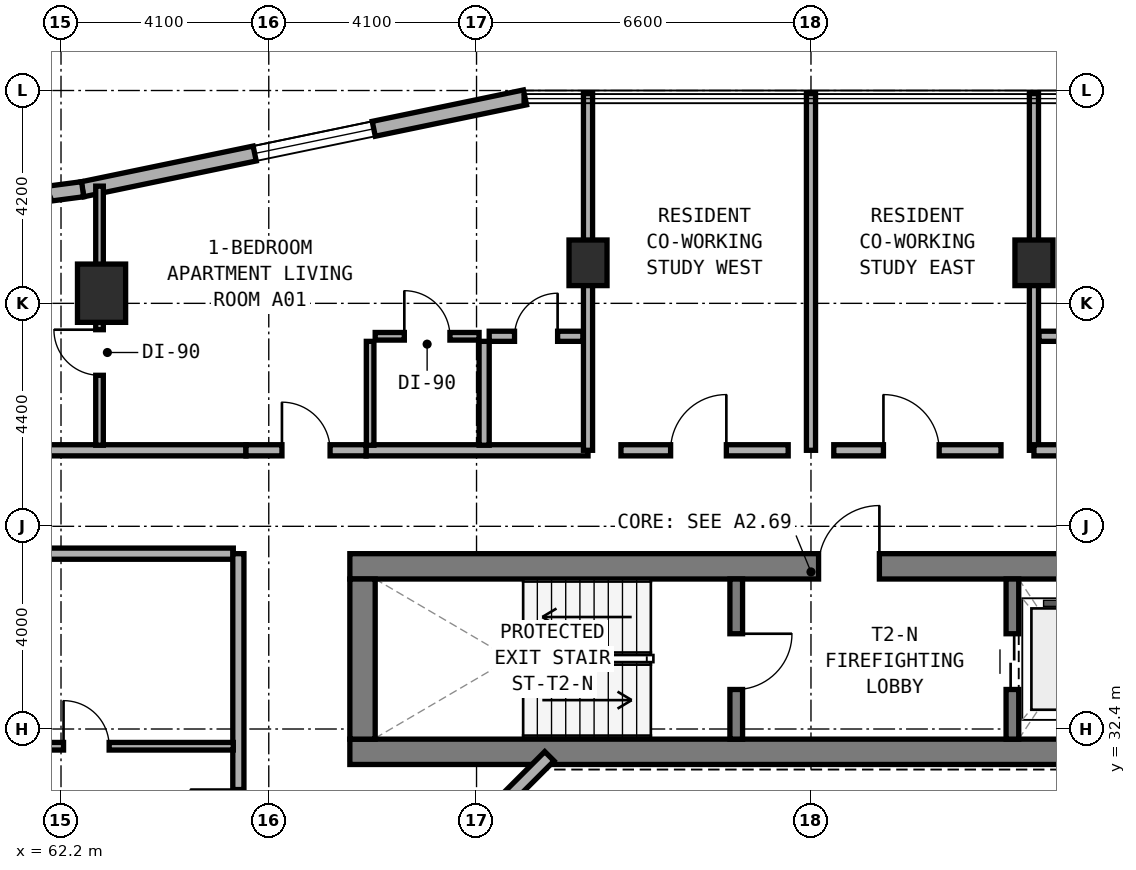
"""IFC4 building model, lengths in metres.
Left out: names, types, materials, properties, quantities, classifications, styles, units other than length and angle.
Written with IfcOpenShell. Run it as: python <this file> out.ifc"""

import sys

from ifc_helpers import new_model, si_unit, direction, frame, frame_2d, origin, origin_2d, place, context, subcontext, project, spatial, rectangle, extrude, element, fill, save


model = new_model("IFC4")
c1 = context("Model", 3, precision=1e-05, world=origin(), true_north=direction((0.0, 1.0)))
c2 = subcontext(c1, "Body", "Model", "MODEL_VIEW")
j1 = project(units=[si_unit("LENGTHUNIT", "METRE"), si_unit("PLANEANGLEUNIT", "RADIAN")], contexts=[c1])
p1 = place(None, origin())
s1 = spatial("IfcSite", under=j1, at=p1, CompositionType="ELEMENT")
p2 = place(p1, origin())
s2 = spatial("IfcBuilding", under=s1, at=p2, CompositionType="ELEMENT")
p3 = place(p2, frame((0.0, 0.0, 62.5)))
s3 = spatial("IfcBuildingStorey", under=s2, at=p3, CompositionType="ELEMENT", Elevation=62.5)
p4 = place(p3, frame((67.9, 31.95, 0.0), z_axis=(0.0, 0.0, 1.0), x_axis=(1.0, 0.0, 0.0)))
e1 = element("IfcWall", 1, at=p4, inside=s3, PredefinedType="SHEAR", context=c2, shape_type="SweptSolid", body=[
    extrude(rectangle(XDim=18.4, YDim=0.5, at=frame_2d((9.2, 0.0))), origin(), (0.0, 0.0, 1.0), 3.5),
])
p5 = place(p3, frame((67.9, 35.61, 0.0), z_axis=(0.0, 0.0, 1.0), x_axis=(1.0, 0.0, 0.0)))
e2 = element("IfcWall", 2, at=p5, inside=s3, PredefinedType="SHEAR", context=c2, shape_type="SweptSolid", body=[
    extrude(rectangle(XDim=18.4, YDim=0.5, at=frame_2d((9.2, 0.0))), origin(), (0.0, 0.0, 1.0), 3.5),
])
p6 = place(p5, frame((9.25, 0.0, 0.0)))
e3 = element("IfcOpeningElement", 3, at=p6, cuts=e2, PredefinedType="OPENING", context=c2, shape_type="SweptSolid", body=[
    extrude(rectangle(XDim=1.2, YDim=2.15, at=frame_2d((0.6, 1.075))), frame((0.0, 0.26, 0.0), z_axis=(0.0, -1.0, 0.0), x_axis=(1.0, 0.0, 0.0)), (0.0, 0.0, 1.0), 0.52),
])
p7 = place(p5, frame((16.85, 0.0, 0.0)))
e4 = element("IfcOpeningElement", 4, at=p7, cuts=e2, PredefinedType="OPENING", context=c2, shape_type="SweptSolid", body=[
    extrude(rectangle(XDim=0.85, YDim=2.1, at=frame_2d((0.425, 1.05))), frame((0.0, 0.26, 0.0), z_axis=(0.0, -1.0, 0.0), x_axis=(1.0, 0.0, 0.0)), (0.0, 0.0, 1.0), 0.52),
])
p8 = place(p3, frame((68.15, 32.2, 0.0), z_axis=(0.0, 0.0, 1.0), x_axis=(0.0, 1.0, 0.0)))
e5 = element("IfcWall", 5, at=p8, inside=s3, PredefinedType="SHEAR", context=c2, shape_type="SweptSolid", body=[
    extrude(rectangle(XDim=3.16, YDim=0.5, at=frame_2d((1.58, 0.0))), origin(), (0.0, 0.0, 1.0), 3.5),
])
p9 = place(p3, frame((75.525, 32.2, 0.0), z_axis=(0.0, 0.0, 1.0), x_axis=(0.0, 1.0, 0.0)))
e6 = element("IfcWall", 6, at=p9, inside=s3, PredefinedType="STANDARD", context=c2, shape_type="SweptSolid", body=[
    extrude(rectangle(XDim=3.16, YDim=0.25, at=frame_2d((1.58, 0.0))), origin(), (0.0, 0.0, 1.0), 3.25),
])
p10 = place(p9, frame((0.98, 0.0, 0.0)))
e7 = element("IfcOpeningElement", 7, at=p10, cuts=e6, PredefinedType="OPENING", context=c2, shape_type="SweptSolid", body=[
    extrude(rectangle(XDim=1.1, YDim=2.15, at=frame_2d((0.55, 1.075))), frame((0.0, 0.135, 0.0), z_axis=(0.0, -1.0, 0.0), x_axis=(1.0, 0.0, 0.0)), (0.0, 0.0, 1.0), 0.27),
])
p11 = place(p3, frame((80.975, 32.2, 0.0), z_axis=(0.0, 0.0, 1.0), x_axis=(0.0, 1.0, 0.0)))
e8 = element("IfcWall", 8, at=p11, inside=s3, PredefinedType="STANDARD", context=c2, shape_type="SweptSolid", body=[
    extrude(rectangle(XDim=3.16, YDim=0.25, at=frame_2d((1.58, 0.0))), origin(), (0.0, 0.0, 1.0), 3.25),
])
p12 = place(p11, frame((0.98, 0.0, 0.0)))
e9 = element("IfcOpeningElement", 9, at=p12, cuts=e8, PredefinedType="OPENING", context=c2, shape_type="SweptSolid", body=[
    extrude(rectangle(XDim=1.1, YDim=2.15, at=frame_2d((0.55, 1.075))), frame((0.0, 0.135, 0.0), z_axis=(0.0, -1.0, 0.0), x_axis=(1.0, 0.0, 0.0)), (0.0, 0.0, 1.0), 0.27),
])
for number, where, z_axis, x_axis in (
    (10, (72.6, 41.6, 0.0), (0.0, 0.0, 1.0), (1.0, 0.0, 0.0)),
    (11, (81.4, 41.6, 0.0), (0.0, 0.0, 1.0), (1.0, 0.0, 0.0)),
):
    element("IfcColumn", number, at=place(p3, frame(where, z_axis=z_axis, x_axis=x_axis)), inside=s3, PredefinedType="COLUMN", context=c2, shape_type="SweptSolid", body=[
        extrude(rectangle(XDim=0.75, YDim=0.9, at=origin_2d()), origin(), (0.0, 0.0, 1.0), 3.5),
    ])
p13 = place(p3, frame((63.0, 41.0, 0.0), z_axis=(0.0, 0.0, 1.0), x_axis=(1.0, 0.0, 0.0)))
e12 = element("IfcColumn", 12, at=p13, inside=s3, PredefinedType="COLUMN", context=c2, shape_type="SweptSolid", body=[
    extrude(rectangle(XDim=0.95, YDim=1.15, at=origin_2d()), origin(), (0.0, 0.0, 1.0), 3.5),
])
p14 = place(p3, frame((71.356, 44.864, 0.0), z_axis=(0.0, 0.0, 1.0), x_axis=(-0.979127260729, -0.203248142175, 0.0)))
e13 = element("IfcWall", 13, at=p14, inside=s3, PredefinedType="STANDARD", context=c2, shape_type="SweptSolid", body=[
    extrude(rectangle(XDim=8.92, YDim=0.3, at=frame_2d((4.46, 0.0))), origin(), (0.0, 0.0, 1.0), 3.25),
])
p15 = place(p14, frame((3.048, 0.0, 0.8)))
e14 = element("IfcOpeningElement", 14, at=p15, cuts=e13, PredefinedType="OPENING", context=c2, shape_type="SweptSolid", body=[
    extrude(rectangle(XDim=2.4, YDim=1.6, at=frame_2d((1.2, 0.8))), frame((0.0, 0.16, 0.0), z_axis=(0.0, -1.0, 0.0), x_axis=(1.0, 0.0, 0.0)), (0.0, 0.0, 1.0), 0.32),
])
p16 = place(p3, frame((62.627, 43.052, 0.0), z_axis=(0.0, 0.0, 1.0), x_axis=(-0.991480488834, -0.130255288807, 0.0)))
e15 = element("IfcWall", 15, at=p16, inside=s3, PredefinedType="STANDARD", context=c2, shape_type="SweptSolid", body=[
    extrude(rectangle(XDim=0.729, YDim=0.3, at=frame_2d((0.365, 0.0))), origin(), (0.0, 0.0, 1.0), 3.25),
])
p17 = place(p3, frame((71.838, 31.862, 0.0), z_axis=(0.0, 0.0, 1.0), x_axis=(-0.707053950914, -0.707159607512, 0.0)))
e16 = element("IfcWall", 16, at=p17, inside=s3, PredefinedType="STANDARD", context=c2, shape_type="SweptSolid", body=[
    extrude(rectangle(XDim=2.311, YDim=0.26, at=frame_2d((1.155, 0.0))), origin(), (0.0, 0.0, 1.0), 3.25),
])
p18 = place(p3, frame((58.16, 37.9, 0.0), z_axis=(0.0, 0.0, 1.0), x_axis=(1.0, 0.0, 0.0)))
e17 = element("IfcWall", 17, at=p18, inside=s3, PredefinedType="SOLIDWALL", context=c2, shape_type="SweptSolid", body=[
    extrude(rectangle(XDim=7.69, YDim=0.22, at=frame_2d((3.845, 0.0))), origin(), (0.0, 0.0, 1.0), 2.865),
])
p19 = place(p3, frame((68.22, 37.9, 0.0), z_axis=(0.0, 0.0, 1.0), x_axis=(1.0, 0.0, 0.0)))
e18 = element("IfcWall", 18, at=p19, inside=s3, PredefinedType="SOLIDWALL", context=c2, shape_type="SweptSolid", body=[
    extrude(rectangle(XDim=4.38, YDim=0.22, at=frame_2d((2.19, 0.0))), origin(), (0.0, 0.0, 1.0), 2.725),
])
p20 = place(p3, frame((65.85, 37.9, 0.0), z_axis=(0.0, 0.0, 1.0), x_axis=(1.0, 0.0, 0.0)))
e19 = element("IfcWall", 19, at=p20, inside=s3, PredefinedType="SOLIDWALL", context=c2, shape_type="SweptSolid", body=[
    extrude(rectangle(XDim=2.37, YDim=0.22, at=frame_2d((1.185, 0.0))), origin(), (0.0, 0.0, 1.0), 3.22),
])
p21 = place(p20, frame((0.71, 0.0, 0.0)))
e20 = element("IfcOpeningElement", 20, at=p21, cuts=e19, PredefinedType="OPENING", context=c2, shape_type="SweptSolid", body=[
    extrude(rectangle(XDim=0.95, YDim=2.1, at=frame_2d((0.475, 1.05))), frame((0.0, 0.12, 0.0), z_axis=(0.0, -1.0, 0.0), x_axis=(1.0, 0.0, 0.0)), (0.0, 0.0, 1.0), 0.24),
])
p22 = place(p3, frame((62.96, 38.0, 0.0), z_axis=(0.0, 0.0, 1.0), x_axis=(0.0, 1.0, 0.0)))
e21 = element("IfcWall", 21, at=p22, inside=s3, PredefinedType="PARTITIONING", context=c2, shape_type="SweptSolid", body=[
    extrude(rectangle(XDim=5.113, YDim=0.15, at=frame_2d((2.557, 0.0))), origin(), (0.0, 0.0, 1.0), 2.865),
])
p23 = place(p22, frame((1.38, 0.0, 0.0)))
e22 = element("IfcOpeningElement", 22, at=p23, cuts=e21, PredefinedType="OPENING", context=c2, shape_type="SweptSolid", body=[
    extrude(rectangle(XDim=0.9, YDim=2.1, at=frame_2d((0.45, 1.05))), frame((0.0, 0.085, 0.0), z_axis=(0.0, -1.0, 0.0), x_axis=(1.0, 0.0, 0.0)), (0.0, 0.0, 1.0), 0.17),
])
p24 = place(p3, frame((70.55, 38.0, 0.0), z_axis=(0.0, 0.0, 1.0), x_axis=(0.0, 1.0, 0.0)))
e23 = element("IfcWall", 23, at=p24, inside=s3, PredefinedType="PLUMBINGWALL", context=c2, shape_type="SweptSolid", body=[
    extrude(rectangle(XDim=2.05, YDim=0.2, at=frame_2d((1.025, 0.0))), origin(), (0.0, 0.0, 1.0), 3.22),
])
p25 = place(p3, frame((68.3, 38.0, 0.0), z_axis=(0.0, 0.0, 1.0), x_axis=(0.0, 1.0, 0.0)))
e24 = element("IfcWall", 24, at=p25, inside=s3, PredefinedType="PARTITIONING", context=c2, shape_type="SweptSolid", body=[
    extrude(rectangle(XDim=2.05, YDim=0.15, at=frame_2d((1.025, 0.0))), origin(), (0.0, 0.0, 1.0), 3.22),
])
p26 = place(p3, frame((70.65, 40.15, 0.0), z_axis=(0.0, 0.0, 1.0), x_axis=(1.0, 0.0, 0.0)))
e25 = element("IfcWall", 25, at=p26, inside=s3, PredefinedType="PLUMBINGWALL", context=c2, shape_type="SweptSolid", body=[
    extrude(rectangle(XDim=1.85, YDim=0.2, at=frame_2d((0.925, 0.0))), origin(), (0.0, 0.0, 1.0), 3.22),
])
p27 = place(p26, frame((0.5, 0.0, 0.0)))
e26 = element("IfcOpeningElement", 26, at=p27, cuts=e25, PredefinedType="OPENING", context=c2, shape_type="SweptSolid", body=[
    extrude(rectangle(XDim=0.85, YDim=2.1, at=frame_2d((0.425, 1.05))), frame((0.0, 0.11, 0.0), z_axis=(0.0, -1.0, 0.0), x_axis=(1.0, 0.0, 0.0)), (0.0, 0.0, 1.0), 0.22),
])
p28 = place(p3, frame((68.4, 40.15, 0.0), z_axis=(0.0, 0.0, 1.0), x_axis=(1.0, 0.0, 0.0)))
e27 = element("IfcWall", 27, at=p28, inside=s3, PredefinedType="PARTITIONING", context=c2, shape_type="SweptSolid", body=[
    extrude(rectangle(XDim=2.05, YDim=0.15, at=frame_2d((1.025, 0.0))), origin(), (0.0, 0.0, 1.0), 3.22),
])
p29 = place(p28, frame((0.575, 0.0, 0.0)))
e28 = element("IfcOpeningElement", 28, at=p29, cuts=e27, PredefinedType="OPENING", context=c2, shape_type="SweptSolid", body=[
    extrude(rectangle(XDim=0.9, YDim=2.1, at=frame_2d((0.45, 1.05))), frame((0.0, 0.085, 0.0), z_axis=(0.0, -1.0, 0.0), x_axis=(1.0, 0.0, 0.0)), (0.0, 0.0, 1.0), 0.17),
])
p30 = place(p3, frame((72.6, 37.9, 0.0), z_axis=(0.0, 0.0, 1.0), x_axis=(0.0, 1.0, 0.0)))
e29 = element("IfcWall", 29, at=p30, inside=s3, PredefinedType="SOLIDWALL", context=c2, shape_type="SweptSolid", body=[
    extrude(rectangle(XDim=7.04, YDim=0.18, at=frame_2d((3.52, 0.0))), origin(), (0.0, 0.0, 1.0), 2.725),
])
p31 = place(p3, frame((77.0, 37.9, 0.0), z_axis=(0.0, 0.0, 1.0), x_axis=(0.0, 1.0, 0.0)))
e30 = element("IfcWall", 30, at=p31, inside=s3, PredefinedType="SOLIDWALL", context=c2, shape_type="SweptSolid", body=[
    extrude(rectangle(XDim=7.04, YDim=0.18, at=frame_2d((3.52, 0.0))), origin(), (0.0, 0.0, 1.0), 2.865),
])
p32 = place(p3, frame((73.25, 37.9, 0.0), z_axis=(0.0, 0.0, 1.0), x_axis=(1.0, 0.0, 0.0)))
e31 = element("IfcWall", 31, at=p32, inside=s3, PredefinedType="SOLIDWALL", context=c2, shape_type="SweptSolid", body=[
    extrude(rectangle(XDim=3.3, YDim=0.22, at=frame_2d((1.65, 0.0))), origin(), (0.0, 0.0, 1.0), 3.22),
])
p33 = place(p32, frame((0.98, 0.0, 0.0)))
e32 = element("IfcOpeningElement", 32, at=p33, cuts=e31, PredefinedType="OPENING", context=c2, shape_type="SweptSolid", body=[
    extrude(rectangle(XDim=1.1, YDim=2.1, at=frame_2d((0.55, 1.05))), frame((0.0, 0.12, 0.0), z_axis=(0.0, -1.0, 0.0), x_axis=(1.0, 0.0, 0.0)), (0.0, 0.0, 1.0), 0.24),
])
p34 = place(p3, frame((77.45, 37.9, 0.0), z_axis=(0.0, 0.0, 1.0), x_axis=(1.0, 0.0, 0.0)))
e33 = element("IfcWall", 33, at=p34, inside=s3, PredefinedType="SOLIDWALL", context=c2, shape_type="SweptSolid", body=[
    extrude(rectangle(XDim=3.3, YDim=0.22, at=frame_2d((1.65, 0.0))), origin(), (0.0, 0.0, 1.0), 3.22),
])
p35 = place(p34, frame((0.98, 0.0, 0.0)))
e34 = element("IfcOpeningElement", 34, at=p35, cuts=e33, PredefinedType="OPENING", context=c2, shape_type="SweptSolid", body=[
    extrude(rectangle(XDim=1.1, YDim=2.1, at=frame_2d((0.55, 1.05))), frame((0.0, 0.12, 0.0), z_axis=(0.0, -1.0, 0.0), x_axis=(1.0, 0.0, 0.0)), (0.0, 0.0, 1.0), 0.24),
])
p36 = place(p3, frame((81.4, 37.9, 0.0), z_axis=(0.0, 0.0, 1.0), x_axis=(0.0, 1.0, 0.0)))
e35 = element("IfcWall", 35, at=p36, inside=s3, PredefinedType="SOLIDWALL", context=c2, shape_type="SweptSolid", body=[
    extrude(rectangle(XDim=7.04, YDim=0.18, at=frame_2d((3.52, 0.0))), origin(), (0.0, 0.0, 1.0), 2.725),
])
p37 = place(p3, frame((81.4, 37.9, 0.0), z_axis=(0.0, 0.0, 1.0), x_axis=(1.0, 0.0, 0.0)))
e36 = element("IfcWall", 36, at=p37, inside=s3, PredefinedType="SOLIDWALL", context=c2, shape_type="SweptSolid", body=[
    extrude(rectangle(XDim=4.38, YDim=0.22, at=frame_2d((2.19, 0.0))), origin(), (0.0, 0.0, 1.0), 2.725),
])
p38 = place(p3, frame((81.5, 40.15, 0.0), z_axis=(0.0, 0.0, 1.0), x_axis=(1.0, 0.0, 0.0)))
e37 = element("IfcWall", 37, at=p38, inside=s3, PredefinedType="PLUMBINGWALL", context=c2, shape_type="SweptSolid", body=[
    extrude(rectangle(XDim=1.85, YDim=0.2, at=frame_2d((0.925, 0.0))), origin(), (0.0, 0.0, 1.0), 2.725),
])
p39 = place(p38, frame((0.5, 0.0, 0.0)))
e38 = element("IfcOpeningElement", 38, at=p39, cuts=e37, PredefinedType="OPENING", context=c2, shape_type="SweptSolid", body=[
    extrude(rectangle(XDim=0.85, YDim=2.1, at=frame_2d((0.425, 1.05))), frame((0.0, 0.11, 0.0), z_axis=(0.0, -1.0, 0.0), x_axis=(1.0, 0.0, 0.0)), (0.0, 0.0, 1.0), 0.22),
])
p40 = place(p3, frame((58.32, 35.86, 0.0), z_axis=(0.0, 0.0, 1.0), x_axis=(1.0, 0.0, 0.0)))
e39 = element("IfcWall", 39, at=p40, inside=s3, PredefinedType="SOLIDWALL", context=c2, shape_type="SweptSolid", body=[
    extrude(rectangle(XDim=7.28, YDim=0.22, at=frame_2d((3.64, 0.0))), origin(), (0.0, 0.0, 1.0), 2.865),
])
p41 = place(p3, frame((65.7, 29.4, 0.0), z_axis=(0.0, 0.0, 1.0), x_axis=(0.0, 1.0, 0.0)))
e40 = element("IfcWall", 40, at=p41, inside=s3, PredefinedType="SOLIDWALL", context=c2, shape_type="SweptSolid", body=[
    extrude(rectangle(XDim=6.46, YDim=0.22, at=frame_2d((3.23, 0.0))), origin(), (0.0, 0.0, 1.0), 3.22),
])
p42 = place(p41, frame((0.855, 0.0, 0.0)))
e41 = element("IfcOpeningElement", 41, at=p42, cuts=e40, PredefinedType="OPENING", context=c2, shape_type="SweptSolid", body=[
    extrude(rectangle(XDim=0.95, YDim=2.1, at=frame_2d((0.475, 1.05))), frame((0.0, 0.12, 0.0), z_axis=(0.0, -1.0, 0.0), x_axis=(1.0, 0.0, 0.0)), (0.0, 0.0, 1.0), 0.24),
])
p43 = place(p3, frame((58.26, 32.06, 0.0), z_axis=(0.0, 0.0, 1.0), x_axis=(1.0, 0.0, 0.0)))
e42 = element("IfcWall", 42, at=p43, inside=s3, PredefinedType="PARTITIONING", context=c2, shape_type="SweptSolid", body=[
    extrude(rectangle(XDim=7.34, YDim=0.15, at=frame_2d((3.67, 0.0))), origin(), (0.0, 0.0, 1.0), 2.865),
])
p44 = place(p43, frame((3.99, 0.0, 0.0)))
e43 = element("IfcOpeningElement", 43, at=p44, cuts=e42, PredefinedType="OPENING", context=c2, shape_type="SweptSolid", body=[
    extrude(rectangle(XDim=0.9, YDim=2.1, at=frame_2d((0.45, 1.05))), frame((0.0, 0.085, 0.0), z_axis=(0.0, -1.0, 0.0), x_axis=(1.0, 0.0, 0.0)), (0.0, 0.0, 1.0), 0.17),
])
p45 = place(p15, origin())
e44 = element("IfcWindow", 44, at=p45, inside=s3, PartitioningType="SINGLE_PANEL", PredefinedType="WINDOW", context=c2, shape_type="SweptSolid", body=[
    extrude(rectangle(XDim=2.4, YDim=1.6, at=frame_2d((1.2, 0.8))), frame((0.0, 0.03, 0.0), z_axis=(0.0, -1.0, 0.0), x_axis=(1.0, 0.0, 0.0)), (0.0, 0.0, 1.0), 0.06),
])
fill(e14, e44)
p46 = place(p10, frame((1.1, 0.0, 0.0), z_axis=(0.0, 0.0, 1.0), x_axis=(-1.0, 0.0, 0.0)))
e45 = element("IfcDoor", 45, at=p46, inside=s3, OperationType="SINGLE_SWING_LEFT", PredefinedType="DOOR", context=c2, shape_type="SweptSolid", body=[
    extrude(rectangle(XDim=1.1, YDim=2.15, at=frame_2d((0.55, 1.075))), frame((0.0, 0.025, 0.0), z_axis=(0.0, -1.0, 0.0), x_axis=(1.0, 0.0, 0.0)), (0.0, 0.0, 1.0), 0.05),
])
fill(e7, e45)
p47 = place(p6, origin())
e46 = element("IfcDoor", 46, at=p47, inside=s3, OperationType="SINGLE_SWING_RIGHT", PredefinedType="DOOR", context=c2, shape_type="SweptSolid", body=[
    extrude(rectangle(XDim=1.2, YDim=2.15, at=frame_2d((0.6, 1.075))), frame((0.0, 0.025, 0.0), z_axis=(0.0, -1.0, 0.0), x_axis=(1.0, 0.0, 0.0)), (0.0, 0.0, 1.0), 0.05),
])
fill(e3, e46)
p48 = place(p12, origin())
e47 = element("IfcDoor", 47, at=p48, inside=s3, OperationType="DOUBLE_DOOR_SLIDING", PredefinedType="DOOR", context=c2, shape_type="SweptSolid", body=[
    extrude(rectangle(XDim=1.1, YDim=2.15, at=frame_2d((0.55, 1.075))), frame((0.0, 0.025, 0.0), z_axis=(0.0, -1.0, 0.0), x_axis=(1.0, 0.0, 0.0)), (0.0, 0.0, 1.0), 0.05),
])
fill(e9, e47)
p49 = place(p21, origin())
e48 = element("IfcDoor", 48, at=p49, inside=s3, OperationType="SINGLE_SWING_LEFT", PredefinedType="DOOR", context=c2, shape_type="SweptSolid", body=[
    extrude(rectangle(XDim=0.95, YDim=2.1, at=frame_2d((0.475, 1.05))), frame((0.0, 0.025, 0.0), z_axis=(0.0, -1.0, 0.0), x_axis=(1.0, 0.0, 0.0)), (0.0, 0.0, 1.0), 0.05),
])
fill(e20, e48)
p50 = place(p23, origin())
e49 = element("IfcDoor", 49, at=p50, inside=s3, OperationType="SINGLE_SWING_RIGHT", PredefinedType="DOOR", context=c2, shape_type="SweptSolid", body=[
    extrude(rectangle(XDim=0.9, YDim=2.1, at=frame_2d((0.45, 1.05))), frame((0.0, 0.025, 0.0), z_axis=(0.0, -1.0, 0.0), x_axis=(1.0, 0.0, 0.0)), (0.0, 0.0, 1.0), 0.05),
])
fill(e22, e49)
p51 = place(p27, origin())
e50 = element("IfcDoor", 50, at=p51, inside=s3, OperationType="SINGLE_SWING_RIGHT", PredefinedType="DOOR", context=c2, shape_type="SweptSolid", body=[
    extrude(rectangle(XDim=0.85, YDim=2.1, at=frame_2d((0.425, 1.05))), frame((0.0, 0.025, 0.0), z_axis=(0.0, -1.0, 0.0), x_axis=(1.0, 0.0, 0.0)), (0.0, 0.0, 1.0), 0.05),
])
fill(e26, e50)
p52 = place(p29, origin())
e51 = element("IfcDoor", 51, at=p52, inside=s3, OperationType="SINGLE_SWING_LEFT", PredefinedType="DOOR", context=c2, shape_type="SweptSolid", body=[
    extrude(rectangle(XDim=0.9, YDim=2.1, at=frame_2d((0.45, 1.05))), frame((0.0, 0.025, 0.0), z_axis=(0.0, -1.0, 0.0), x_axis=(1.0, 0.0, 0.0)), (0.0, 0.0, 1.0), 0.05),
])
fill(e28, e51)
p53 = place(p33, origin())
e52 = element("IfcDoor", 52, at=p53, inside=s3, OperationType="SINGLE_SWING_RIGHT", PredefinedType="DOOR", context=c2, shape_type="SweptSolid", body=[
    extrude(rectangle(XDim=1.1, YDim=2.1, at=frame_2d((0.55, 1.05))), frame((0.0, 0.025, 0.0), z_axis=(0.0, -1.0, 0.0), x_axis=(1.0, 0.0, 0.0)), (0.0, 0.0, 1.0), 0.05),
])
fill(e32, e52)
p54 = place(p35, origin())
e53 = element("IfcDoor", 53, at=p54, inside=s3, OperationType="SINGLE_SWING_LEFT", PredefinedType="DOOR", context=c2, shape_type="SweptSolid", body=[
    extrude(rectangle(XDim=1.1, YDim=2.1, at=frame_2d((0.55, 1.05))), frame((0.0, 0.025, 0.0), z_axis=(0.0, -1.0, 0.0), x_axis=(1.0, 0.0, 0.0)), (0.0, 0.0, 1.0), 0.05),
])
fill(e34, e53)
p55 = place(p42, origin())
e54 = element("IfcDoor", 54, at=p55, inside=s3, OperationType="SINGLE_SWING_RIGHT", PredefinedType="DOOR", context=c2, shape_type="SweptSolid", body=[
    extrude(rectangle(XDim=0.95, YDim=2.1, at=frame_2d((0.475, 1.05))), frame((0.0, 0.025, 0.0), z_axis=(0.0, -1.0, 0.0), x_axis=(1.0, 0.0, 0.0)), (0.0, 0.0, 1.0), 0.05),
])
fill(e41, e54)
p56 = place(p44, origin())
e55 = element("IfcDoor", 55, at=p56, inside=s3, OperationType="SINGLE_SWING_LEFT", PredefinedType="DOOR", context=c2, shape_type="SweptSolid", body=[
    extrude(rectangle(XDim=0.9, YDim=2.1, at=frame_2d((0.45, 1.05))), frame((0.0, 0.025, 0.0), z_axis=(0.0, -1.0, 0.0), x_axis=(1.0, 0.0, 0.0)), (0.0, 0.0, 1.0), 0.05),
])
fill(e43, e55)
save(model, sys.argv[1])
